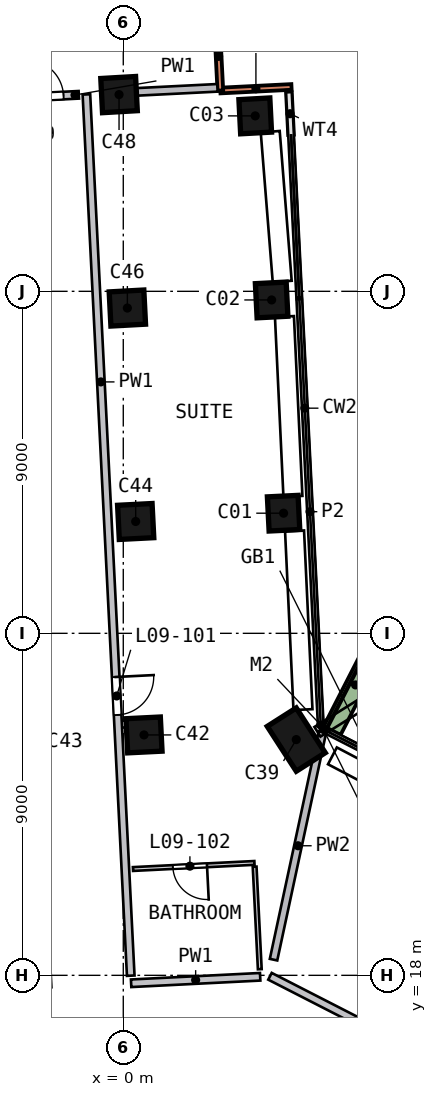
"""IFC4 building model, lengths in metres.
Left out: names, types, materials, properties, quantities, classifications, styles, units other than length and angle.
Written with IfcOpenShell. Run it as: python <this file> out.ifc"""

import sys

from ifc_helpers import new_model, si_unit, direction, frame, frame_2d, origin, origin_2d, place, context, subcontext, project, spatial, rectangle, extrude, element, fill, save


model = new_model("IFC4")
c1 = context("Model", 3, precision=1e-05, world=origin(), true_north=direction((0.0, 1.0)))
c2 = subcontext(c1, "Body", "Model", "MODEL_VIEW")
j1 = project(units=[si_unit("LENGTHUNIT", "METRE"), si_unit("PLANEANGLEUNIT", "RADIAN")], contexts=[c1])
p1 = place(None, origin())
s1 = spatial("IfcSite", under=j1, at=p1, CompositionType="ELEMENT")
p2 = place(p1, origin())
s2 = spatial("IfcBuilding", under=s1, at=p2, CompositionType="ELEMENT")
p3 = place(p2, frame((0.0, 0.0, 46.0)))
s3 = spatial("IfcBuildingStorey", under=s2, at=p3, CompositionType="ELEMENT", Elevation=46.0)
p4 = place(p3, frame((4.39, 30.157, 0.0), z_axis=(-0.142046154, 0.003636382, 0.989853356), x_axis=(-0.048251296, 0.998779051, -0.01059334)))
e1 = element("IfcColumn", 1, at=p4, inside=s3, PredefinedType="COLUMN", context=c2, shape_type="SweptSolid", body=[
    extrude(rectangle(XDim=0.9, YDim=0.8, at=origin_2d()), origin(), (0.0, 0.0, 1.0), 3.223),
])
p5 = place(p3, frame((4.107, 35.79, 0.0), z_axis=(-0.166902986, -0.013958884, 0.985874507), x_axis=(-0.051051324, 0.9986809, 0.005497508)))
e2 = element("IfcColumn", 2, at=p5, inside=s3, PredefinedType="COLUMN", context=c2, shape_type="SweptSolid", body=[
    extrude(rectangle(XDim=0.9, YDim=0.8, at=origin_2d()), origin(), (0.0, 0.0, 1.0), 3.236),
])
p6 = place(p3, frame((3.702, 40.656, 0.0), z_axis=(-0.18797592, -0.032005492, 0.981652027), x_axis=(-0.054917817, 0.998247812, 0.022030399)))
e3 = element("IfcColumn", 3, at=p6, inside=s3, PredefinedType="COLUMN", context=c2, shape_type="SweptSolid", body=[
    extrude(rectangle(XDim=0.9, YDim=0.8, at=origin_2d()), origin(), (0.0, 0.0, 1.0), 3.25),
])
p7 = place(p3, frame((4.691, 24.178, 0.0), z_axis=(-0.115152044, 0.021282226, 0.993119869), x_axis=(0.535782843, -0.8405444, 0.080136495)))
e4 = element("IfcColumn", 4, at=p7, inside=s3, PredefinedType="COLUMN", context=c2, shape_type="SweptSolid", body=[
    extrude(rectangle(XDim=1.4, YDim=0.9, at=origin_2d()), origin(), (0.0, 0.0, 1.0), 3.212),
])
p8 = place(p3, frame((0.685, 24.323, 0.0), z_axis=(-0.115702898, 0.002280609, 0.993281248), x_axis=(-0.049384985, 0.99874741, -0.008045796)))
e5 = element("IfcColumn", 5, at=p8, inside=s3, PredefinedType="COLUMN", context=c2, shape_type="SweptSolid", body=[
    extrude(rectangle(XDim=0.9, YDim=0.9, at=origin_2d()), origin(), (0.0, 0.0, 1.0), 3.211),
])
p9 = place(p3, frame((0.497, 29.961, 0.0), z_axis=(-0.140917837, -0.014849406, 0.989909924), x_axis=(-0.051180049, 0.998659797, 0.007694966)))
e6 = element("IfcColumn", 6, at=p9, inside=s3, PredefinedType="COLUMN", context=c2, shape_type="SweptSolid", body=[
    extrude(rectangle(XDim=0.9, YDim=0.9, at=origin_2d()), origin(), (0.0, 0.0, 1.0), 3.222),
])
p10 = place(p3, frame((0.309, 35.599, 0.0), z_axis=(-0.165807484, -0.031909266, 0.985641759), x_axis=(-0.054307644, 0.998255119, 0.023181824)))
e7 = element("IfcColumn", 7, at=p10, inside=s3, PredefinedType="COLUMN", context=c2, shape_type="SweptSolid", body=[
    extrude(rectangle(XDim=0.9, YDim=0.9, at=origin_2d()), origin(), (0.0, 0.0, 1.0), 3.236),
])
p11 = place(p3, frame((0.122, 41.237, 0.0), z_axis=(-0.190381344, -0.048777246, 0.980497692), x_axis=(-0.058012748, 0.997578478, 0.038362748)))
e8 = element("IfcColumn", 8, at=p11, inside=s3, PredefinedType="COLUMN", context=c2, shape_type="SweptSolid", body=[
    extrude(rectangle(XDim=0.9, YDim=0.9, at=origin_2d()), origin(), (0.0, 0.0, 1.0), 3.253),
])
p12 = place(p3, frame((4.427, 41.378, 0.0), z_axis=(0.0, 0.0, 1.0), x_axis=(-0.99873605, -0.050262336, 0.0)))
e9 = element("IfcWall", 9, at=p12, inside=s3, PredefinedType="SOLIDWALL", context=c2, shape_type="SweptSolid", body=[
    extrude(rectangle(XDim=1.875, YDim=0.15, at=frame_2d((0.938, 0.0))), origin(), (0.0, 0.0, 1.0), 3.19),
])
p13 = place(p3, frame((2.554, 41.284, 0.0), z_axis=(0.0, 0.0, 1.0), x_axis=(-0.050316413, 0.998733327, 0.0)))
e10 = element("IfcWall", 10, at=p13, inside=s3, PredefinedType="SOLIDWALL", context=c2, shape_type="SweptSolid", body=[
    extrude(rectangle(XDim=1.8, YDim=0.15, at=frame_2d((0.9, 0.0))), origin(), (0.0, 0.0, 1.0), 3.19),
])
p14 = place(p3, frame((4.415, 40.118, 0.0), z_axis=(0.0, 0.0, 1.0), x_axis=(-0.050244017, 0.998736972, 0.0)))
e11 = element("IfcWall", 11, at=p14, inside=s3, PredefinedType="SOLIDWALL", context=c2, shape_type="SweptSolid", body=[
    extrude(rectangle(XDim=1.113, YDim=0.15, at=frame_2d((0.556, 0.0))), origin(), (0.0, 0.0, 1.0), 2.425),
])
p15 = place(p3, frame((6.726, 26.844, 0.0), z_axis=(0.0, 0.0, 1.0), x_axis=(-0.45587587, -0.890043365, 0.0)))
e12 = element("IfcWall", 12, at=p15, inside=s3, PredefinedType="SOLIDWALL", context=c2, shape_type="SweptSolid", body=[
    extrude(rectangle(XDim=2.699, YDim=0.5, at=frame_2d((1.35, 0.0))), origin(), (0.0, 0.0, 1.0), 0.7),
])
p16 = place(p3, frame((-2.97, 41.081, 0.0), z_axis=(0.0, 0.0, 1.0), x_axis=(0.998742521, 0.050133596, 0.0)))
e13 = element("IfcWall", 13, at=p16, inside=s3, PredefinedType="SOLIDWALL", context=c2, shape_type="SweptSolid", body=[
    extrude(rectangle(XDim=1.802, YDim=0.2, at=frame_2d((0.901, 0.0))), origin(), (0.0, 0.0, 1.0), 3.19),
])
p17 = place(p16, frame((0.4, 0.0, 0.0)))
e14 = element("IfcOpeningElement", 14, at=p17, cuts=e13, PredefinedType="OPENING", context=c2, shape_type="SweptSolid", body=[
    extrude(rectangle(XDim=1.0, YDim=2.1, at=frame_2d((0.5, 1.05))), frame((0.0, 0.11, 0.0), z_axis=(0.0, -1.0, 0.0), x_axis=(1.0, 0.0, 0.0)), (0.0, 0.0, 1.0), 0.22),
])
p18 = place(p3, frame((-0.97, 41.182, 0.0), z_axis=(0.0, 0.0, 1.0), x_axis=(0.050247535, -0.998736795, 0.0)))
e15 = element("IfcWall", 15, at=p18, inside=s3, PredefinedType="SOLIDWALL", context=c2, shape_type="SweptSolid", body=[
    extrude(rectangle(XDim=23.22, YDim=0.2, at=frame_2d((11.61, 0.0))), origin(), (0.0, 0.0, 1.0), 3.19),
])
p19 = place(p18, frame((15.35, 0.0, 0.0)))
e16 = element("IfcOpeningElement", 16, at=p19, cuts=e15, PredefinedType="OPENING", context=c2, shape_type="SweptSolid", body=[
    extrude(rectangle(XDim=1.0, YDim=2.1, at=frame_2d((0.5, 1.05))), frame((0.0, 0.11, 0.0), z_axis=(0.0, -1.0, 0.0), x_axis=(1.0, 0.0, 0.0)), (0.0, 0.0, 1.0), 0.22),
])
p20 = place(p3, frame((3.602, 17.962, 0.0), z_axis=(0.0, 0.0, 1.0), x_axis=(-0.998739593, -0.050191888, 0.0)))
e17 = element("IfcWall", 17, at=p20, inside=s3, PredefinedType="SOLIDWALL", context=c2, shape_type="SweptSolid", body=[
    extrude(rectangle(XDim=3.4, YDim=0.2, at=frame_2d((1.7, 0.0))), origin(), (0.0, 0.0, 1.0), 3.19),
])
p21 = place(p3, frame((12.33, 13.637, 0.0), z_axis=(0.0, 0.0, 1.0), x_axis=(-0.890044127, 0.455874383, 0.0)))
e18 = element("IfcWall", 18, at=p21, inside=s3, PredefinedType="SOLIDWALL", context=c2, shape_type="SweptSolid", body=[
    extrude(rectangle(XDim=9.516, YDim=0.2, at=frame_2d((4.758, 0.0))), origin(), (0.0, 0.0, 1.0), 3.19),
])
p22 = place(p3, frame((-0.524, 41.204, 0.0), z_axis=(0.0, 0.0, 1.0), x_axis=(0.998734445, 0.050294226, 0.0)))
e19 = element("IfcWall", 19, at=p22, inside=s3, PredefinedType="SOLIDWALL", context=c2, shape_type="SweptSolid", body=[
    extrude(rectangle(XDim=3.005, YDim=0.2, at=frame_2d((1.502, 0.0))), origin(), (0.0, 0.0, 1.0), 3.19),
])
p23 = place(p3, frame((5.241, 24.408, 0.0), z_axis=(0.0, 0.0, 1.0), x_axis=(-0.209939641, -0.977714348, 0.0)))
e20 = element("IfcWall", 20, at=p23, inside=s3, PredefinedType="SOLIDWALL", context=c2, shape_type="SweptSolid", body=[
    extrude(rectangle(XDim=6.132, YDim=0.2, at=frame_2d((3.066, 0.0))), origin(), (0.0, 0.0, 1.0), 3.19),
])
p24 = place(p3, frame((3.451, 20.958, 0.0), z_axis=(0.0, 0.0, 1.0), x_axis=(-0.998735349, -0.050276266, 0.0)))
e21 = element("IfcWall", 21, at=p24, inside=s3, PredefinedType="PARTITIONING", context=c2, shape_type="SweptSolid", body=[
    extrude(rectangle(XDim=3.2, YDim=0.1, at=frame_2d((1.6, 0.0))), origin(), (0.0, 0.0, 1.0), 3.19),
])
p25 = place(p24, frame((1.25, 0.0, 0.0)))
e22 = element("IfcOpeningElement", 22, at=p25, cuts=e21, PredefinedType="OPENING", context=c2, shape_type="SweptSolid", body=[
    extrude(rectangle(XDim=0.9, YDim=2.1, at=frame_2d((0.45, 1.05))), frame((0.0, 0.06, 0.0), z_axis=(0.0, -1.0, 0.0), x_axis=(1.0, 0.0, 0.0)), (0.0, 0.0, 1.0), 0.12),
])
p26 = place(p3, frame((3.456, 20.858, 0.0), z_axis=(0.0, 0.0, 1.0), x_axis=(0.050271319, -0.998735598, 0.0)))
e23 = element("IfcWall", 23, at=p26, inside=s3, PredefinedType="PARTITIONING", context=c2, shape_type="SweptSolid", body=[
    extrude(rectangle(XDim=2.7, YDim=0.1, at=frame_2d((1.35, 0.0))), origin(), (0.0, 0.0, 1.0), 3.19),
])
p27 = place(p19, origin())
e24 = element("IfcDoor", 24, at=p27, inside=s3, OperationType="SINGLE_SWING_LEFT", PredefinedType="DOOR", context=c2, shape_type="SweptSolid", body=[
    extrude(rectangle(XDim=1.0, YDim=2.1, at=frame_2d((0.5, 1.05))), frame((0.0, 0.025, 0.0), z_axis=(0.0, -1.0, 0.0), x_axis=(1.0, 0.0, 0.0)), (0.0, 0.0, 1.0), 0.05),
])
fill(e16, e24)
p28 = place(p25, origin())
e25 = element("IfcDoor", 25, at=p28, inside=s3, OperationType="SINGLE_SWING_LEFT", PredefinedType="DOOR", context=c2, shape_type="SweptSolid", body=[
    extrude(rectangle(XDim=0.9, YDim=2.1, at=frame_2d((0.45, 1.05))), frame((0.0, 0.025, 0.0), z_axis=(0.0, -1.0, 0.0), x_axis=(1.0, 0.0, 0.0)), (0.0, 0.0, 1.0), 0.05),
])
fill(e22, e25)
p29 = place(p17, origin())
e26 = element("IfcDoor", 26, at=p29, inside=s3, OperationType="SINGLE_SWING_LEFT", PredefinedType="DOOR", context=c2, shape_type="SweptSolid", body=[
    extrude(rectangle(XDim=1.0, YDim=2.1, at=frame_2d((0.5, 1.05))), frame((0.0, 0.025, 0.0), z_axis=(0.0, -1.0, 0.0), x_axis=(1.0, 0.0, 0.0)), (0.0, 0.0, 1.0), 0.05),
])
fill(e14, e26)
save(model, sys.argv[1])
